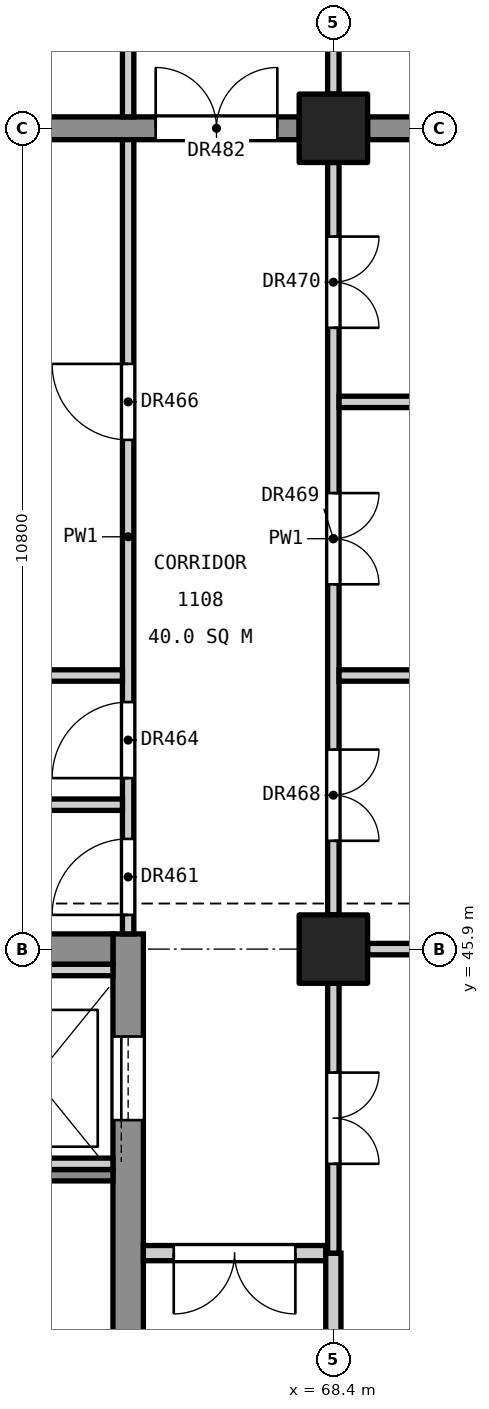
"""IFC4 building model, lengths in metres.
Left out: names, types, materials, properties, quantities, classifications, styles, units other than length and angle.
Written with IfcOpenShell. Run it as: python <this file> out.ifc"""

import sys

from ifc_helpers import new_model, si_unit, direction, frame, frame_2d, origin, origin_2d, place, context, subcontext, project, spatial, rectangle, extrude, element, fill, save


model = new_model("IFC4")
c1 = context("Model", 3, precision=1e-05, world=origin(), true_north=direction((0.0, 1.0)))
c2 = subcontext(c1, "Body", "Model", "MODEL_VIEW")
j1 = project(units=[si_unit("LENGTHUNIT", "METRE"), si_unit("PLANEANGLEUNIT", "RADIAN")], contexts=[c1])
p1 = place(None, origin())
s1 = spatial("IfcSite", under=j1, at=p1, CompositionType="ELEMENT")
p2 = place(p1, origin())
s2 = spatial("IfcBuilding", under=s1, at=p2, CompositionType="ELEMENT")
p3 = place(p2, frame((0.0, 0.0, 55.8)))
s3 = spatial("IfcBuildingStorey", under=s2, at=p3, CompositionType="ELEMENT", Elevation=55.8)
for number, where, z_axis, x_axis in (
    (1, (68.4, 45.9, 0.0), (0.0, 0.0, 1.0), (1.0, 0.0, 0.0)),
    (2, (68.4, 56.7, 0.0), (0.0, 0.0, 1.0), (1.0, 0.0, 0.0)),
):
    element("IfcColumn", number, at=place(p3, frame(where, z_axis=z_axis, x_axis=x_axis)), inside=s3, PredefinedType="COLUMN", context=c2, shape_type="SweptSolid", body=[
        extrude(rectangle(XDim=0.9, YDim=0.9, at=origin_2d()), origin(), (0.0, 0.0, 1.0), 4.8),
    ])
p4 = place(p3, frame((65.7, 34.9, 0.0), z_axis=(0.0, 0.0, 1.0), x_axis=(0.0, 1.0, 0.0)))
e3 = element("IfcWall", 3, at=p4, inside=s3, PredefinedType="SHEAR", context=c2, shape_type="SweptSolid", body=[
    extrude(rectangle(XDim=11.2, YDim=0.4, at=frame_2d((5.6, 0.0))), origin(), (0.0, 0.0, 1.0), 4.55),
])
p5 = place(p4, frame((0.5, 0.0, 0.0)))
e4 = element("IfcOpeningElement", 4, at=p5, cuts=e3, PredefinedType="OPENING", context=c2, shape_type="SweptSolid", body=[
    extrude(rectangle(XDim=1.4, YDim=2.1, at=frame_2d((0.7, 1.05))), frame((0.0, 0.21, 0.0), z_axis=(0.0, -1.0, 0.0), x_axis=(1.0, 0.0, 0.0)), (0.0, 0.0, 1.0), 0.42),
])
p6 = place(p4, frame((8.75, 0.0, 0.0)))
e5 = element("IfcOpeningElement", 5, at=p6, cuts=e3, PredefinedType="OPENING", context=c2, shape_type="SweptSolid", body=[
    extrude(rectangle(XDim=1.1, YDim=2.1, at=frame_2d((0.55, 1.05))), frame((0.0, 0.21, 0.0), z_axis=(0.0, -1.0, 0.0), x_axis=(1.0, 0.0, 0.0)), (0.0, 0.0, 1.0), 0.42),
])
p7 = place(p3, frame((61.4, 45.9, 0.0), z_axis=(0.0, 0.0, 1.0), x_axis=(1.0, 0.0, 0.0)))
e6 = element("IfcWall", 6, at=p7, inside=s3, PredefinedType="SHEAR", context=c2, shape_type="SweptSolid", body=[
    extrude(rectangle(XDim=4.1, YDim=0.4, at=frame_2d((2.05, 0.0))), origin(), (0.0, 0.0, 1.0), 4.55),
])
p8 = place(p3, frame((61.65, 56.7, 0.0), z_axis=(0.0, 0.0, 1.0), x_axis=(1.0, 0.0, 0.0)))
e7 = element("IfcWall", 7, at=p8, inside=s3, PredefinedType="SHEAR", context=c2, shape_type="SweptSolid", body=[
    extrude(rectangle(XDim=6.3, YDim=0.3, at=frame_2d((3.15, 0.0))), origin(), (0.0, 0.0, 1.0), 4.55),
])
p9 = place(p8, frame((4.413, 0.0, 0.0)))
e8 = element("IfcOpeningElement", 8, at=p9, cuts=e7, PredefinedType="OPENING", context=c2, shape_type="SweptSolid", body=[
    extrude(rectangle(XDim=1.6, YDim=2.1, at=frame_2d((0.8, 1.05))), frame((0.0, 0.16, 0.0), z_axis=(0.0, -1.0, 0.0), x_axis=(1.0, 0.0, 0.0)), (0.0, 0.0, 1.0), 0.32),
])
p10 = place(p3, frame((68.85, 56.7, 0.0), z_axis=(0.0, 0.0, 1.0), x_axis=(1.0, 0.0, 0.0)))
e9 = element("IfcWall", 9, at=p10, inside=s3, PredefinedType="SHEAR", context=c2, shape_type="SweptSolid", body=[
    extrude(rectangle(XDim=9.9, YDim=0.3, at=frame_2d((4.95, 0.0))), origin(), (0.0, 0.0, 1.0), 4.55),
])
p11 = place(p3, frame((61.4, 42.925, 0.0), z_axis=(0.0, 0.0, 1.0), x_axis=(1.0, 0.0, 0.0)))
e10 = element("IfcWall", 10, at=p11, inside=s3, PredefinedType="SOLIDWALL", context=c2, shape_type="SweptSolid", body=[
    extrude(rectangle(XDim=4.1, YDim=0.15, at=frame_2d((2.05, 0.0))), origin(), (0.0, 0.0, 1.0), 4.55),
])
for number, where, z_axis, x_axis in (
    (11, (63.65, 43.075, 0.0), (0.0, 0.0, 1.0), (1.0, 0.0, 0.0)),
    (12, (63.65, 45.625, 0.0), (0.0, 0.0, 1.0), (1.0, 0.0, 0.0)),
):
    element("IfcWall", number, at=place(p3, frame(where, z_axis=z_axis, x_axis=x_axis)), inside=s3, PredefinedType="SOLIDWALL", context=c2, shape_type="SweptSolid", body=[
        extrude(rectangle(XDim=1.85, YDim=0.15, at=frame_2d((0.925, 0.0))), origin(), (0.0, 0.0, 1.0), 4.8),
    ])
p12 = place(p3, frame((65.7, 46.1, 0.0), z_axis=(0.0, 0.0, 1.0), x_axis=(0.0, 1.0, 0.0)))
e13 = element("IfcWall", 13, at=p12, inside=s3, PredefinedType="PARTITIONING", context=c2, shape_type="SweptSolid", body=[
    extrude(rectangle(XDim=10.45, YDim=0.15, at=frame_2d((5.225, 0.0))), origin(), (0.0, 0.0, 1.0), 3.55),
])
p13 = place(p12, frame((0.25, 0.0, 0.0)))
e14 = element("IfcOpeningElement", 14, at=p13, cuts=e13, PredefinedType="OPENING", context=c2, shape_type="SweptSolid", body=[
    extrude(rectangle(XDim=1.0, YDim=2.1, at=frame_2d((0.5, 1.05))), frame((0.0, 0.085, 0.0), z_axis=(0.0, -1.0, 0.0), x_axis=(1.0, 0.0, 0.0)), (0.0, 0.0, 1.0), 0.17),
])
p14 = place(p12, frame((2.05, 0.0, 0.0)))
e15 = element("IfcOpeningElement", 15, at=p14, cuts=e13, PredefinedType="OPENING", context=c2, shape_type="SweptSolid", body=[
    extrude(rectangle(XDim=1.0, YDim=2.1, at=frame_2d((0.5, 1.05))), frame((0.0, 0.085, 0.0), z_axis=(0.0, -1.0, 0.0), x_axis=(1.0, 0.0, 0.0)), (0.0, 0.0, 1.0), 0.17),
])
p15 = place(p12, frame((6.5, 0.0, 0.0)))
e16 = element("IfcOpeningElement", 16, at=p15, cuts=e13, PredefinedType="OPENING", context=c2, shape_type="SweptSolid", body=[
    extrude(rectangle(XDim=1.0, YDim=2.1, at=frame_2d((0.5, 1.05))), frame((0.0, 0.085, 0.0), z_axis=(0.0, -1.0, 0.0), x_axis=(1.0, 0.0, 0.0)), (0.0, 0.0, 1.0), 0.17),
])
p16 = place(p3, frame((65.7, 56.85, 0.0), z_axis=(0.0, 0.0, 1.0), x_axis=(0.0, 1.0, 0.0)))
e17 = element("IfcWall", 17, at=p16, inside=s3, PredefinedType="PARTITIONING", context=c2, shape_type="SweptSolid", body=[
    extrude(rectangle(XDim=3.25, YDim=0.15, at=frame_2d((1.625, 0.0))), origin(), (0.0, 0.0, 1.0), 3.55),
])
p17 = place(p16, frame((1.15, 0.0, 0.0)))
e18 = element("IfcOpeningElement", 18, at=p17, cuts=e17, PredefinedType="OPENING", context=c2, shape_type="SweptSolid", body=[
    extrude(rectangle(XDim=1.0, YDim=2.1, at=frame_2d((0.5, 1.05))), frame((0.0, 0.085, 0.0), z_axis=(0.0, -1.0, 0.0), x_axis=(1.0, 0.0, 0.0)), (0.0, 0.0, 1.0), 0.17),
])
p18 = place(p3, frame((61.35, 47.8, 0.0), z_axis=(0.0, 0.0, 1.0), x_axis=(1.0, 0.0, 0.0)))
e19 = element("IfcWall", 19, at=p18, inside=s3, PredefinedType="PARTITIONING", context=c2, shape_type="SweptSolid", body=[
    extrude(rectangle(XDim=4.275, YDim=0.15, at=frame_2d((2.137, 0.0))), origin(), (0.0, 0.0, 1.0), 3.55),
])
p19 = place(p3, frame((61.35, 49.5, 0.0), z_axis=(0.0, 0.0, 1.0), x_axis=(1.0, 0.0, 0.0)))
e20 = element("IfcWall", 20, at=p19, inside=s3, PredefinedType="PARTITIONING", context=c2, shape_type="SweptSolid", body=[
    extrude(rectangle(XDim=4.275, YDim=0.15, at=frame_2d((2.137, 0.0))), origin(), (0.0, 0.0, 1.0), 3.85),
])
p20 = place(p3, frame((65.9, 41.9, 0.0), z_axis=(0.0, 0.0, 1.0), x_axis=(1.0, 0.0, 0.0)))
e21 = element("IfcWall", 21, at=p20, inside=s3, PredefinedType="PARTITIONING", context=c2, shape_type="SweptSolid", body=[
    extrude(rectangle(XDim=2.4, YDim=0.2, at=frame_2d((1.2, 0.0))), origin(), (0.0, 0.0, 1.0), 3.55),
])
p21 = place(p20, frame((0.4, 0.0, 0.0)))
e22 = element("IfcOpeningElement", 22, at=p21, cuts=e21, PredefinedType="OPENING", context=c2, shape_type="SweptSolid", body=[
    extrude(rectangle(XDim=1.6, YDim=2.1, at=frame_2d((0.8, 1.05))), frame((0.0, 0.11, 0.0), z_axis=(0.0, -1.0, 0.0), x_axis=(1.0, 0.0, 0.0)), (0.0, 0.0, 1.0), 0.22),
])
p22 = place(p3, frame((68.4, 35.55, 0.0), z_axis=(0.0, 0.0, 1.0), x_axis=(0.0, 1.0, 0.0)))
e23 = element("IfcWall", 23, at=p22, inside=s3, PredefinedType="PARTITIONING", context=c2, shape_type="SweptSolid", body=[
    extrude(rectangle(XDim=6.35, YDim=0.2, at=frame_2d((3.175, 0.0))), origin(), (0.0, 0.0, 1.0), 3.55),
])
p23 = place(p3, frame((68.4, 41.9, 0.0), z_axis=(0.0, 0.0, 1.0), x_axis=(0.0, 1.0, 0.0)))
e24 = element("IfcWall", 24, at=p23, inside=s3, PredefinedType="PARTITIONING", context=c2, shape_type="SweptSolid", body=[
    extrude(rectangle(XDim=3.55, YDim=0.15, at=frame_2d((1.775, 0.0))), origin(), (0.0, 0.0, 1.0), 3.55),
])
p24 = place(p23, frame((1.175, 0.0, 0.0)))
e25 = element("IfcOpeningElement", 25, at=p24, cuts=e24, PredefinedType="OPENING", context=c2, shape_type="SweptSolid", body=[
    extrude(rectangle(XDim=1.2, YDim=2.1, at=frame_2d((0.6, 1.05))), frame((0.0, 0.085, 0.0), z_axis=(0.0, -1.0, 0.0), x_axis=(1.0, 0.0, 0.0)), (0.0, 0.0, 1.0), 0.17),
])
p25 = place(p3, frame((68.4, 46.35, 0.0), z_axis=(0.0, 0.0, 1.0), x_axis=(0.0, 1.0, 0.0)))
e26 = element("IfcWall", 26, at=p25, inside=s3, PredefinedType="PARTITIONING", context=c2, shape_type="SweptSolid", body=[
    extrude(rectangle(XDim=9.9, YDim=0.15, at=frame_2d((4.95, 0.0))), origin(), (0.0, 0.0, 1.0), 3.55),
])
p26 = place(p25, frame((0.975, 0.0, 0.0)))
e27 = element("IfcOpeningElement", 27, at=p26, cuts=e26, PredefinedType="OPENING", context=c2, shape_type="SweptSolid", body=[
    extrude(rectangle(XDim=1.2, YDim=2.1, at=frame_2d((0.6, 1.05))), frame((0.0, 0.085, 0.0), z_axis=(0.0, -1.0, 0.0), x_axis=(1.0, 0.0, 0.0)), (0.0, 0.0, 1.0), 0.17),
])
p27 = place(p25, frame((4.35, 0.0, 0.0)))
e28 = element("IfcOpeningElement", 28, at=p27, cuts=e26, PredefinedType="OPENING", context=c2, shape_type="SweptSolid", body=[
    extrude(rectangle(XDim=1.2, YDim=2.1, at=frame_2d((0.6, 1.05))), frame((0.0, 0.085, 0.0), z_axis=(0.0, -1.0, 0.0), x_axis=(1.0, 0.0, 0.0)), (0.0, 0.0, 1.0), 0.17),
])
p28 = place(p25, frame((7.725, 0.0, 0.0)))
e29 = element("IfcOpeningElement", 29, at=p28, cuts=e26, PredefinedType="OPENING", context=c2, shape_type="SweptSolid", body=[
    extrude(rectangle(XDim=1.2, YDim=2.1, at=frame_2d((0.6, 1.05))), frame((0.0, 0.085, 0.0), z_axis=(0.0, -1.0, 0.0), x_axis=(1.0, 0.0, 0.0)), (0.0, 0.0, 1.0), 0.17),
])
p29 = place(p3, frame((68.4, 57.15, 0.0), z_axis=(0.0, 0.0, 1.0), x_axis=(0.0, 1.0, 0.0)))
e30 = element("IfcWall", 30, at=p29, inside=s3, PredefinedType="PARTITIONING", context=c2, shape_type="SweptSolid", body=[
    extrude(rectangle(XDim=3.15, YDim=0.15, at=frame_2d((1.575, 0.0))), origin(), (0.0, 0.0, 1.0), 3.55),
])
p30 = place(p29, frame((0.975, 0.0, 0.0)))
e31 = element("IfcOpeningElement", 31, at=p30, cuts=e30, PredefinedType="OPENING", context=c2, shape_type="SweptSolid", body=[
    extrude(rectangle(XDim=1.2, YDim=2.1, at=frame_2d((0.6, 1.05))), frame((0.0, 0.085, 0.0), z_axis=(0.0, -1.0, 0.0), x_axis=(1.0, 0.0, 0.0)), (0.0, 0.0, 1.0), 0.17),
])
p31 = place(p3, frame((68.85, 45.9, 0.0), z_axis=(0.0, 0.0, 1.0), x_axis=(1.0, 0.0, 0.0)))
e32 = element("IfcWall", 32, at=p31, inside=s3, PredefinedType="PARTITIONING", context=c2, shape_type="SweptSolid", body=[
    extrude(rectangle(XDim=9.9, YDim=0.15, at=frame_2d((4.95, 0.0))), origin(), (0.0, 0.0, 1.0), 3.85),
])
for number, where, z_axis, x_axis in (
    (33, (68.475, 49.5, 0.0), (0.0, 0.0, 1.0), (1.0, 0.0, 0.0)),
    (34, (68.475, 53.1, 0.0), (0.0, 0.0, 1.0), (1.0, 0.0, 0.0)),
):
    element("IfcWall", number, at=place(p3, frame(where, z_axis=z_axis, x_axis=x_axis)), inside=s3, PredefinedType="PARTITIONING", context=c2, shape_type="SweptSolid", body=[
        extrude(rectangle(XDim=10.575, YDim=0.15, at=frame_2d((5.288, 0.0))), origin(), (0.0, 0.0, 1.0), 3.85),
    ])
p32 = place(p6, origin())
e35 = element("IfcDoor", 35, at=p32, inside=s3, OperationType="SLIDING_TO_LEFT", PredefinedType="DOOR", context=c2, shape_type="SweptSolid", body=[
    extrude(rectangle(XDim=1.1, YDim=2.1, at=frame_2d((0.55, 1.05))), frame((0.0, 0.025, 0.0), z_axis=(0.0, -1.0, 0.0), x_axis=(1.0, 0.0, 0.0)), (0.0, 0.0, 1.0), 0.05),
])
fill(e5, e35)
p33 = place(p13, origin())
e36 = element("IfcDoor", 36, at=p33, inside=s3, OperationType="SINGLE_SWING_LEFT", PredefinedType="DOOR", context=c2, shape_type="SweptSolid", body=[
    extrude(rectangle(XDim=1.0, YDim=2.1, at=frame_2d((0.5, 1.05))), frame((0.0, 0.025, 0.0), z_axis=(0.0, -1.0, 0.0), x_axis=(1.0, 0.0, 0.0)), (0.0, 0.0, 1.0), 0.05),
])
fill(e14, e36)
p34 = place(p14, origin())
e37 = element("IfcDoor", 37, at=p34, inside=s3, OperationType="SINGLE_SWING_LEFT", PredefinedType="DOOR", context=c2, shape_type="SweptSolid", body=[
    extrude(rectangle(XDim=1.0, YDim=2.1, at=frame_2d((0.5, 1.05))), frame((0.0, 0.025, 0.0), z_axis=(0.0, -1.0, 0.0), x_axis=(1.0, 0.0, 0.0)), (0.0, 0.0, 1.0), 0.05),
])
fill(e15, e37)
p35 = place(p15, origin())
e38 = element("IfcDoor", 38, at=p35, inside=s3, OperationType="SINGLE_SWING_RIGHT", PredefinedType="DOOR", context=c2, shape_type="SweptSolid", body=[
    extrude(rectangle(XDim=1.0, YDim=2.1, at=frame_2d((0.5, 1.05))), frame((0.0, 0.025, 0.0), z_axis=(0.0, -1.0, 0.0), x_axis=(1.0, 0.0, 0.0)), (0.0, 0.0, 1.0), 0.05),
])
fill(e16, e38)
p36 = place(p24, frame((1.2, 0.0, 0.0), z_axis=(0.0, 0.0, 1.0), x_axis=(-1.0, 0.0, 0.0)))
e39 = element("IfcDoor", 39, at=p36, inside=s3, OperationType="DOUBLE_DOOR_SINGLE_SWING", PredefinedType="DOOR", context=c2, shape_type="SweptSolid", body=[
    extrude(rectangle(XDim=1.2, YDim=2.1, at=frame_2d((0.6, 1.05))), frame((0.0, 0.025, 0.0), z_axis=(0.0, -1.0, 0.0), x_axis=(1.0, 0.0, 0.0)), (0.0, 0.0, 1.0), 0.05),
])
fill(e25, e39)
p37 = place(p26, frame((1.2, 0.0, 0.0), z_axis=(0.0, 0.0, 1.0), x_axis=(-1.0, 0.0, 0.0)))
e40 = element("IfcDoor", 40, at=p37, inside=s3, OperationType="DOUBLE_DOOR_SINGLE_SWING", PredefinedType="DOOR", context=c2, shape_type="SweptSolid", body=[
    extrude(rectangle(XDim=1.2, YDim=2.1, at=frame_2d((0.6, 1.05))), frame((0.0, 0.025, 0.0), z_axis=(0.0, -1.0, 0.0), x_axis=(1.0, 0.0, 0.0)), (0.0, 0.0, 1.0), 0.05),
])
fill(e27, e40)
p38 = place(p27, frame((1.2, 0.0, 0.0), z_axis=(0.0, 0.0, 1.0), x_axis=(-1.0, 0.0, 0.0)))
e41 = element("IfcDoor", 41, at=p38, inside=s3, OperationType="DOUBLE_DOOR_SINGLE_SWING", PredefinedType="DOOR", context=c2, shape_type="SweptSolid", body=[
    extrude(rectangle(XDim=1.2, YDim=2.1, at=frame_2d((0.6, 1.05))), frame((0.0, 0.025, 0.0), z_axis=(0.0, -1.0, 0.0), x_axis=(1.0, 0.0, 0.0)), (0.0, 0.0, 1.0), 0.05),
])
fill(e28, e41)
p39 = place(p28, frame((1.2, 0.0, 0.0), z_axis=(0.0, 0.0, 1.0), x_axis=(-1.0, 0.0, 0.0)))
e42 = element("IfcDoor", 42, at=p39, inside=s3, OperationType="DOUBLE_DOOR_SINGLE_SWING", PredefinedType="DOOR", context=c2, shape_type="SweptSolid", body=[
    extrude(rectangle(XDim=1.2, YDim=2.1, at=frame_2d((0.6, 1.05))), frame((0.0, 0.025, 0.0), z_axis=(0.0, -1.0, 0.0), x_axis=(1.0, 0.0, 0.0)), (0.0, 0.0, 1.0), 0.05),
])
fill(e29, e42)
p40 = place(p21, frame((1.6, 0.0, 0.0), z_axis=(0.0, 0.0, 1.0), x_axis=(-1.0, 0.0, 0.0)))
e43 = element("IfcDoor", 43, at=p40, inside=s3, OperationType="DOUBLE_DOOR_SINGLE_SWING", PredefinedType="DOOR", context=c2, shape_type="SweptSolid", body=[
    extrude(rectangle(XDim=1.6, YDim=2.1, at=frame_2d((0.8, 1.05))), frame((0.0, 0.025, 0.0), z_axis=(0.0, -1.0, 0.0), x_axis=(1.0, 0.0, 0.0)), (0.0, 0.0, 1.0), 0.05),
])
fill(e22, e43)
p41 = place(p9, origin())
e44 = element("IfcDoor", 44, at=p41, inside=s3, OperationType="DOUBLE_DOOR_SINGLE_SWING", PredefinedType="DOOR", context=c2, shape_type="SweptSolid", body=[
    extrude(rectangle(XDim=1.6, YDim=2.1, at=frame_2d((0.8, 1.05))), frame((0.0, 0.025, 0.0), z_axis=(0.0, -1.0, 0.0), x_axis=(1.0, 0.0, 0.0)), (0.0, 0.0, 1.0), 0.05),
])
fill(e8, e44)
save(model, sys.argv[1])
